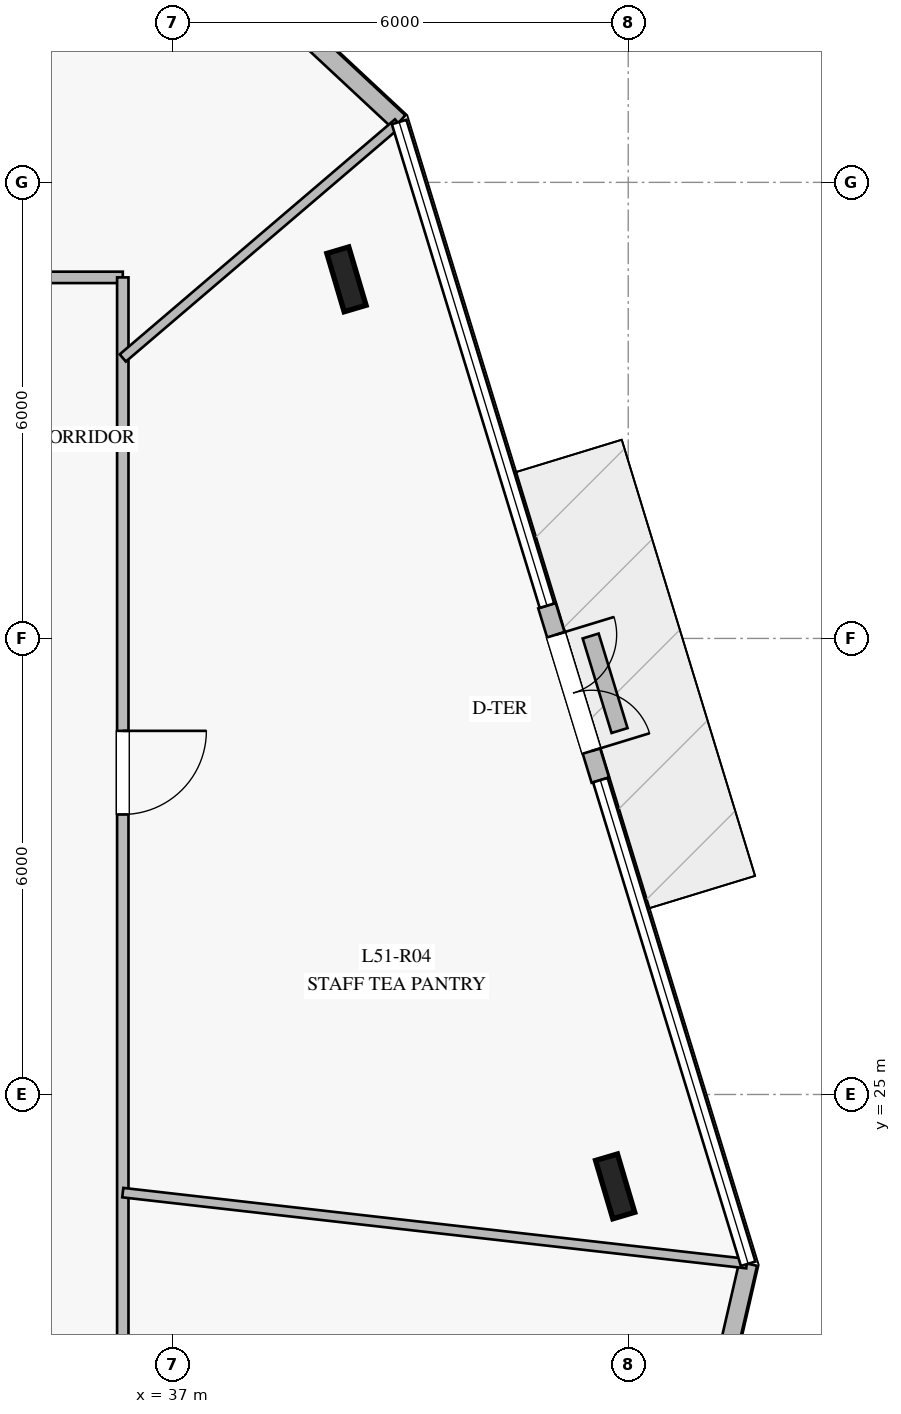
"""IFC4 building model, lengths in metres.
Left out: names, types, materials, properties, quantities, classifications, styles, units other than length and angle.
Written with IfcOpenShell. Run it as: python <this file> out.ifc"""

import sys

from ifc_helpers import new_model, si_unit, direction, frame, frame_2d, origin, origin_2d, place, context, subcontext, project, spatial, rectangle, i_section, extrude, element, fill, save


model = new_model("IFC4")
c1 = context("Model", 3, precision=1e-05, world=origin(), true_north=direction((0.0, 1.0)))
c2 = subcontext(c1, "Body", "Model", "MODEL_VIEW")
j1 = project(units=[si_unit("LENGTHUNIT", "METRE"), si_unit("PLANEANGLEUNIT", "RADIAN")], contexts=[c1])
p1 = place(None, origin())
s1 = spatial("IfcSite", under=j1, at=p1, CompositionType="ELEMENT")
p2 = place(p1, origin())
s2 = spatial("IfcBuilding", under=s1, at=p2, CompositionType="ELEMENT")
p3 = place(p2, frame((0.0, 0.0, 212.8)))
s3 = spatial("IfcBuildingStorey", under=s2, at=p3, CompositionType="ELEMENT", Elevation=212.8)
for number, where, z_axis, x_axis in (
    (1, (42.828, 23.791, 0.0), (0.0, 0.0, 1.0), (-0.284, 0.959, 0.0)),
    (2, (39.293, 35.724, 0.0), (0.0, 0.0, 1.0), (-0.284, 0.959, 0.0)),
):
    element("IfcColumn", number, at=place(p3, frame(where, z_axis=z_axis, x_axis=x_axis)), inside=s3, PredefinedType="COLUMN", context=c2, shape_type="SweptSolid", body=[
        extrude(i_section(OverallWidth=0.3, OverallDepth=0.8, WebThickness=0.018, FlangeThickness=0.033, at=origin_2d()), origin(), (0.0, 0.0, 1.0), 4.0),
    ])
p4 = place(p3, frame((43.573, 18.419, 0.0), z_axis=(0.0, 0.0, 1.0), x_axis=(0.224883448427, 0.974385670371, 0.0)))
e3 = element("IfcWall", 3, at=p4, inside=s3, PredefinedType="STANDARD", context=c2, shape_type="SweptSolid", body=[
    extrude(rectangle(XDim=4.469, YDim=0.24, at=frame_2d((2.234, 0.0))), origin(), (0.0, 0.0, 1.0), 3.78),
])
p5 = place(p3, frame((42.633, 29.136, 0.0), z_axis=(0.0, 0.0, 1.0), x_axis=(-0.292570005461, 0.95624410686, 0.0)))
e4 = element("IfcWall", 4, at=p5, inside=s3, PredefinedType="STANDARD", context=c2, shape_type="SweptSolid", body=[
    extrude(rectangle(XDim=2.4, YDim=0.24, at=frame_2d((1.2, 0.0))), origin(), (0.0, 0.0, 1.0), 3.78),
])
p6 = place(p5, frame((0.4, 0.0, 0.0)))
e5 = element("IfcOpeningElement", 5, at=p6, cuts=e4, PredefinedType="OPENING", context=c2, shape_type="SweptSolid", body=[
    extrude(rectangle(XDim=1.6, YDim=2.25, at=frame_2d((0.8, 1.125))), frame((0.0, 0.13, 0.0), z_axis=(0.0, -1.0, 0.0), x_axis=(1.0, 0.0, 0.0)), (0.0, 0.0, 1.0), 0.26),
])
p7 = place(p3, frame((39.986, 37.794, 0.0), z_axis=(0.0, 0.0, 1.0), x_axis=(-0.73139858415, 0.681950226265, 0.0)))
e6 = element("IfcWall", 6, at=p7, inside=s3, PredefinedType="STANDARD", context=c2, shape_type="SweptSolid", body=[
    extrude(rectangle(XDim=4.468, YDim=0.24, at=frame_2d((2.234, 0.0))), origin(), (0.0, 0.0, 1.0), 3.78),
])
p8 = place(p3, frame((42.886, 29.788, 0.0), z_axis=(0.0, 0.0, 1.0), x_axis=(-0.292080232212, 0.956393819486, 0.0)))
e7 = element("IfcWall", 7, at=p8, inside=s3, PredefinedType="USERDEFINED", context=c2, shape_type="SweptSolid", body=[
    extrude(rectangle(XDim=1.301, YDim=0.22, at=frame_2d((0.65, 0.0))), origin(), (0.0, 0.0, 1.0), 0.4),
])
p9 = place(p3, frame((13.65, 35.75, 0.0), z_axis=(0.0, 0.0, 1.0), x_axis=(1.0, 0.0, 0.0)))
e8 = element("IfcWall", 8, at=p9, inside=s3, PredefinedType="PARTITIONING", context=c2, shape_type="SweptSolid", body=[
    extrude(rectangle(XDim=22.7, YDim=0.15, at=frame_2d((11.35, 0.0))), origin(), (0.0, 0.0, 1.0), 3.28),
])
p10 = place(p9, frame((16.829, 0.0, 0.0)))
e9 = element("IfcOpeningElement", 9, at=p10, cuts=e8, PredefinedType="OPENING", context=c2, shape_type="SweptSolid", body=[
    extrude(rectangle(XDim=1.1, YDim=2.2, at=frame_2d((0.55, 1.1))), frame((0.0, 0.085, 0.0), z_axis=(0.0, -1.0, 0.0), x_axis=(1.0, 0.0, 0.0)), (0.0, 0.0, 1.0), 0.17),
])
p11 = place(p9, frame((5.668, 0.0, 0.0)))
e10 = element("IfcOpeningElement", 10, at=p11, cuts=e8, PredefinedType="OPENING", context=c2, shape_type="SweptSolid", body=[
    extrude(rectangle(XDim=1.1, YDim=2.2, at=frame_2d((0.55, 1.1))), frame((0.0, 0.085, 0.0), z_axis=(0.0, -1.0, 0.0), x_axis=(1.0, 0.0, 0.0)), (0.0, 0.0, 1.0), 0.17),
])
p12 = place(p3, frame((36.35, 35.75, 0.0), z_axis=(0.0, 0.0, 1.0), x_axis=(0.0, -1.0, 0.0)))
e11 = element("IfcWall", 11, at=p12, inside=s3, PredefinedType="PARTITIONING", context=c2, shape_type="SweptSolid", body=[
    extrude(rectangle(XDim=21.5, YDim=0.15, at=frame_2d((10.75, 0.0))), origin(), (0.0, 0.0, 1.0), 3.02),
])
p13 = place(p12, frame((16.13, 0.0, 0.0)))
e12 = element("IfcOpeningElement", 12, at=p13, cuts=e11, PredefinedType="OPENING", context=c2, shape_type="SweptSolid", body=[
    extrude(rectangle(XDim=1.1, YDim=2.2, at=frame_2d((0.55, 1.1))), frame((0.0, 0.085, 0.0), z_axis=(0.0, -1.0, 0.0), x_axis=(1.0, 0.0, 0.0)), (0.0, 0.0, 1.0), 0.17),
])
p14 = place(p12, frame((5.966, 0.0, 0.0)))
e13 = element("IfcOpeningElement", 13, at=p14, cuts=e11, PredefinedType="OPENING", context=c2, shape_type="SweptSolid", body=[
    extrude(rectangle(XDim=1.1, YDim=2.2, at=frame_2d((0.55, 1.1))), frame((0.0, 0.085, 0.0), z_axis=(0.0, -1.0, 0.0), x_axis=(1.0, 0.0, 0.0)), (0.0, 0.0, 1.0), 0.17),
])
p15 = place(p3, frame((36.35, 23.709, 0.0), z_axis=(0.0, 0.0, 1.0), x_axis=(0.993589877184, -0.113044928931, 0.0)))
e14 = element("IfcWall", 14, at=p15, inside=s3, PredefinedType="PARTITIONING", context=c2, shape_type="SweptSolid", body=[
    extrude(rectangle(XDim=8.263, YDim=0.125, at=frame_2d((4.131, 0.0))), origin(), (0.0, 0.0, 1.0), 3.05),
])
p16 = place(p3, frame((36.35, 34.69, 0.0), z_axis=(0.0, 0.0, 1.0), x_axis=(0.760539803365, 0.649291311737, 0.0)))
e15 = element("IfcWall", 15, at=p16, inside=s3, PredefinedType="PARTITIONING", context=c2, shape_type="SweptSolid", body=[
    extrude(rectangle(XDim=4.762, YDim=0.125, at=frame_2d((2.381, 0.0))), origin(), (0.0, 0.0, 1.0), 3.18),
])
p17 = place(p6, frame((1.6, 0.0, 0.0), z_axis=(0.0, 0.0, 1.0), x_axis=(-1.0, 0.0, 0.0)))
e16 = element("IfcDoor", 16, at=p17, inside=s3, OperationType="DOUBLE_DOOR_SINGLE_SWING", PredefinedType="DOOR", context=c2, shape_type="SweptSolid", body=[
    extrude(rectangle(XDim=1.6, YDim=2.25, at=frame_2d((0.8, 1.125))), frame((0.0, 0.025, 0.0), z_axis=(0.0, -1.0, 0.0), x_axis=(1.0, 0.0, 0.0)), (0.0, 0.0, 1.0), 0.05),
])
fill(e5, e16)
p18 = place(p14, origin())
e17 = element("IfcDoor", 17, at=p18, inside=s3, OperationType="SINGLE_SWING_LEFT", PredefinedType="DOOR", context=c2, shape_type="SweptSolid", body=[
    extrude(rectangle(XDim=1.1, YDim=2.2, at=frame_2d((0.55, 1.1))), frame((0.0, 0.025, 0.0), z_axis=(0.0, -1.0, 0.0), x_axis=(1.0, 0.0, 0.0)), (0.0, 0.0, 1.0), 0.05),
])
fill(e13, e17)
save(model, sys.argv[1])
